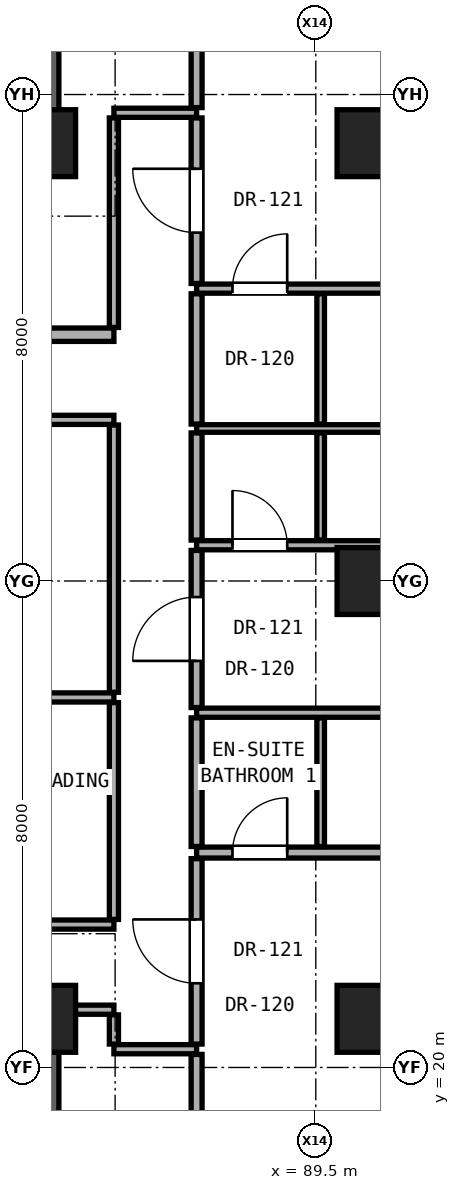
"""IFC4 building model, lengths in metres.
Left out: names, types, materials, properties, quantities, classifications, styles, units other than length and angle.
Written with IfcOpenShell. Run it as: python <this file> out.ifc"""

import sys

from ifc_helpers import new_model, si_unit, direction, frame, frame_2d, origin, origin_2d, place, context, subcontext, project, spatial, rectangle, hollow_rectangle, extrude, element, fill, save


model = new_model("IFC4")
c1 = context("Model", 3, precision=1e-05, world=origin(), true_north=direction((0.0, 1.0)))
c2 = subcontext(c1, "Body", "Model", "MODEL_VIEW")
j1 = project(units=[si_unit("LENGTHUNIT", "METRE"), si_unit("PLANEANGLEUNIT", "RADIAN")], contexts=[c1])
p1 = place(None, origin())
s1 = spatial("IfcSite", under=j1, at=p1, CompositionType="ELEMENT")
p2 = place(p1, origin())
s2 = spatial("IfcBuilding", under=s1, at=p2, CompositionType="ELEMENT")
p3 = place(p2, frame((0.0, 0.0, 141.2)))
s3 = spatial("IfcBuildingStorey", under=s2, at=p3, CompositionType="ELEMENT", Elevation=141.2)
for number, where, z_axis, x_axis in (
    (1, (85.0, 20.8, 0.0), (0.0, 0.0, 1.0), (1.0, 0.0, 0.0)),
    (2, (85.0, 35.2, 0.0), (0.0, 0.0, 1.0), (1.0, 0.0, 0.0)),
):
    element("IfcColumn", number, at=place(p3, frame(where, z_axis=z_axis, x_axis=x_axis)), inside=s3, PredefinedType="COLUMN", context=c2, shape_type="SweptSolid", body=[
        extrude(rectangle(XDim=1.1, YDim=1.1, at=origin_2d()), origin(), (0.0, 0.0, 1.0), 3.3),
    ])
for number, where, z_axis, x_axis in (
    (3, (90.4, 20.8, 0.0), (0.0, 0.0, 1.0), (1.0, 0.0, 0.0)),
    (4, (90.4, 28.0, 0.0), (0.0, 0.0, 1.0), (1.0, 0.0, 0.0)),
    (5, (90.4, 35.2, 0.0), (0.0, 0.0, 1.0), (1.0, 0.0, 0.0)),
):
    element("IfcColumn", number, at=place(p3, frame(where, z_axis=z_axis, x_axis=x_axis)), inside=s3, PredefinedType="COLUMN", context=c2, shape_type="SweptSolid", body=[
        extrude(hollow_rectangle(XDim=1.1, YDim=1.1, WallThickness=0.06, at=origin_2d()), origin(), (0.0, 0.0, 1.0), 3.3),
    ])
for number, where, z_axis, x_axis in (
    (6, (85.0, 35.2, 0.0), (0.0, 0.0, 1.0), (0.0, 1.0, 0.0)),
    (7, (85.0, 15.2, 0.0), (0.0, 0.0, 1.0), (0.0, 1.0, 0.0)),
):
    element("IfcWall", number, at=place(p3, frame(where, z_axis=z_axis, x_axis=x_axis)), inside=s3, PredefinedType="SHEAR", context=c2, shape_type="SweptSolid", body=[
        extrude(rectangle(XDim=5.6, YDim=0.55, at=frame_2d((2.8, 0.0))), origin(), (0.0, 0.0, 1.0), 3.08),
    ])
p4 = place(p3, frame((86.18, 20.3, 0.0), z_axis=(0.0, 0.0, 1.0), x_axis=(1.0, 0.0, 0.0)))
e8 = element("IfcWall", 8, at=p4, inside=s3, PredefinedType="PARTITIONING", context=c2, shape_type="SweptSolid", body=[
    extrude(rectangle(XDim=1.36, YDim=0.15, at=frame_2d((0.68, 0.0))), origin(), (0.0, 0.0, 1.0), 3.08),
])
p5 = place(p3, frame((85.27, 20.95, 0.0), z_axis=(0.0, 0.0, 1.0), x_axis=(1.0, 0.0, 0.0)))
e9 = element("IfcWall", 9, at=p5, inside=s3, PredefinedType="PARTITIONING", context=c2, shape_type="SweptSolid", body=[
    extrude(rectangle(XDim=0.91, YDim=0.15, at=frame_2d((0.455, 0.0))), origin(), (0.0, 0.0, 1.0), 2.472),
])
p6 = place(p3, frame((66.68, 22.35, 0.0), z_axis=(0.0, 0.0, 1.0), x_axis=(1.0, 0.0, 0.0)))
e10 = element("IfcWall", 10, at=p6, inside=s3, PredefinedType="PARTITIONING", context=c2, shape_type="SweptSolid", body=[
    extrude(rectangle(XDim=19.5, YDim=0.15, at=frame_2d((9.75, 0.0))), origin(), (0.0, 0.0, 1.0), 2.216),
])
p7 = place(p6, frame((8.802, 0.0, 0.0)))
e11 = element("IfcOpeningElement", 11, at=p7, cuts=e10, PredefinedType="OPENING", context=c2, shape_type="SweptSolid", body=[
    extrude(rectangle(XDim=1.05, YDim=2.2, at=frame_2d((0.525, 1.1))), frame((0.0, 0.085, 0.0), z_axis=(0.0, -1.0, 0.0), x_axis=(1.0, 0.0, 0.0)), (0.0, 0.0, 1.0), 0.17),
])
p8 = place(p6, frame((15.846, 0.0, 0.0)))
e12 = element("IfcOpeningElement", 12, at=p8, cuts=e10, PredefinedType="OPENING", context=c2, shape_type="SweptSolid", body=[
    extrude(rectangle(XDim=1.05, YDim=2.2, at=frame_2d((0.525, 1.1))), frame((0.0, 0.085, 0.0), z_axis=(0.0, -1.0, 0.0), x_axis=(1.0, 0.0, 0.0)), (0.0, 0.0, 1.0), 0.17),
])
p9 = place(p3, frame((87.54, 23.534, 0.0), z_axis=(0.0, 0.0, 1.0), x_axis=(1.0, 0.0, 0.0)))
e13 = element("IfcWall", 13, at=p9, inside=s3, PredefinedType="PARTITIONING", context=c2, shape_type="SweptSolid", body=[
    extrude(rectangle(XDim=7.471, YDim=0.18, at=frame_2d((3.735, 0.0))), origin(), (0.0, 0.0, 1.0), 2.299),
])
p10 = place(p9, frame((4.26, 0.0, 0.0)))
e14 = element("IfcOpeningElement", 14, at=p10, cuts=e13, PredefinedType="OPENING", context=c2, shape_type="SweptSolid", body=[
    extrude(rectangle(XDim=0.95, YDim=2.15, at=frame_2d((0.475, 1.075))), frame((0.0, 0.1, 0.0), z_axis=(0.0, -1.0, 0.0), x_axis=(1.0, 0.0, 0.0)), (0.0, 0.0, 1.0), 0.2),
])
p11 = place(p9, frame((0.59, 0.0, 0.0)))
e15 = element("IfcOpeningElement", 15, at=p11, cuts=e13, PredefinedType="OPENING", context=c2, shape_type="SweptSolid", body=[
    extrude(rectangle(XDim=0.9, YDim=2.1, at=frame_2d((0.45, 1.05))), frame((0.0, 0.1, 0.0), z_axis=(0.0, -1.0, 0.0), x_axis=(1.0, 0.0, 0.0)), (0.0, 0.0, 1.0), 0.2),
])
p12 = place(p3, frame((87.54, 25.834, 0.0), z_axis=(0.0, 0.0, 1.0), x_axis=(1.0, 0.0, 0.0)))
e16 = element("IfcWall", 16, at=p12, inside=s3, PredefinedType="PARTITIONING", context=c2, shape_type="SweptSolid", body=[
    extrude(rectangle(XDim=7.471, YDim=0.15, at=frame_2d((3.735, 0.0))), origin(), (0.0, 0.0, 1.0), 2.299),
])
p13 = place(p3, frame((72.05, 26.085, 0.0), z_axis=(0.0, 0.0, 1.0), x_axis=(1.0, 0.0, 0.0)))
e17 = element("IfcWall", 17, at=p13, inside=s3, PredefinedType="PARTITIONING", context=c2, shape_type="SweptSolid", body=[
    extrude(rectangle(XDim=14.13, YDim=0.15, at=frame_2d((7.065, 0.0))), origin(), (0.0, 0.0, 1.0), 2.216),
])
p14 = place(p3, frame((87.54, 28.588, 0.0), z_axis=(0.0, 0.0, 1.0), x_axis=(1.0, 0.0, 0.0)))
e18 = element("IfcWall", 18, at=p14, inside=s3, PredefinedType="PARTITIONING", context=c2, shape_type="SweptSolid", body=[
    extrude(rectangle(XDim=7.471, YDim=0.15, at=frame_2d((3.735, 0.0))), origin(), (0.0, 0.0, 1.0), 2.299),
])
p15 = place(p14, frame((4.26, 0.0, 0.0)))
e19 = element("IfcOpeningElement", 19, at=p15, cuts=e18, PredefinedType="OPENING", context=c2, shape_type="SweptSolid", body=[
    extrude(rectangle(XDim=0.95, YDim=2.15, at=frame_2d((0.475, 1.075))), frame((0.0, 0.085, 0.0), z_axis=(0.0, -1.0, 0.0), x_axis=(1.0, 0.0, 0.0)), (0.0, 0.0, 1.0), 0.17),
])
p16 = place(p14, frame((0.59, 0.0, 0.0)))
e20 = element("IfcOpeningElement", 20, at=p16, cuts=e18, PredefinedType="OPENING", context=c2, shape_type="SweptSolid", body=[
    extrude(rectangle(XDim=0.9, YDim=2.1, at=frame_2d((0.45, 1.05))), frame((0.0, 0.085, 0.0), z_axis=(0.0, -1.0, 0.0), x_axis=(1.0, 0.0, 0.0)), (0.0, 0.0, 1.0), 0.17),
])
p17 = place(p3, frame((66.68, 30.65, 0.0), z_axis=(0.0, 0.0, 1.0), x_axis=(1.0, 0.0, 0.0)))
e21 = element("IfcWall", 21, at=p17, inside=s3, PredefinedType="PARTITIONING", context=c2, shape_type="SweptSolid", body=[
    extrude(rectangle(XDim=19.5, YDim=0.15, at=frame_2d((9.75, 0.0))), origin(), (0.0, 0.0, 1.0), 2.216),
])
p18 = place(p17, frame((3.745, 0.0, 0.0)))
e22 = element("IfcOpeningElement", 22, at=p18, cuts=e21, PredefinedType="OPENING", context=c2, shape_type="SweptSolid", body=[
    extrude(rectangle(XDim=0.95, YDim=2.15, at=frame_2d((0.475, 1.075))), frame((0.0, 0.085, 0.0), z_axis=(0.0, -1.0, 0.0), x_axis=(1.0, 0.0, 0.0)), (0.0, 0.0, 1.0), 0.17),
])
p19 = place(p17, frame((8.802, 0.0, 0.0)))
e23 = element("IfcOpeningElement", 23, at=p19, cuts=e21, PredefinedType="OPENING", context=c2, shape_type="SweptSolid", body=[
    extrude(rectangle(XDim=1.05, YDim=2.2, at=frame_2d((0.525, 1.1))), frame((0.0, 0.085, 0.0), z_axis=(0.0, -1.0, 0.0), x_axis=(1.0, 0.0, 0.0)), (0.0, 0.0, 1.0), 0.17),
])
p20 = place(p17, frame((15.846, 0.0, 0.0)))
e24 = element("IfcOpeningElement", 24, at=p20, cuts=e21, PredefinedType="OPENING", context=c2, shape_type="SweptSolid", body=[
    extrude(rectangle(XDim=1.05, YDim=2.2, at=frame_2d((0.525, 1.1))), frame((0.0, 0.085, 0.0), z_axis=(0.0, -1.0, 0.0), x_axis=(1.0, 0.0, 0.0)), (0.0, 0.0, 1.0), 0.17),
])
p21 = place(p3, frame((87.54, 30.508, 0.0), z_axis=(0.0, 0.0, 1.0), x_axis=(1.0, 0.0, 0.0)))
e25 = element("IfcWall", 25, at=p21, inside=s3, PredefinedType="PARTITIONING", context=c2, shape_type="SweptSolid", body=[
    extrude(rectangle(XDim=7.471, YDim=0.125, at=frame_2d((3.735, 0.0))), origin(), (0.0, 0.0, 1.0), 2.299),
])
p22 = place(p3, frame((71.55, 32.05, 0.0), z_axis=(0.0, 0.0, 1.0), x_axis=(1.0, 0.0, 0.0)))
e26 = element("IfcWall", 26, at=p22, inside=s3, PredefinedType="SOLIDWALL", context=c2, shape_type="SweptSolid", body=[
    extrude(rectangle(XDim=14.63, YDim=0.22, at=frame_2d((7.315, 0.0))), origin(), (0.0, 0.0, 1.0), 2.216),
])
p23 = place(p22, frame((6.065, 0.0, 0.0)))
e27 = element("IfcOpeningElement", 27, at=p23, cuts=e26, PredefinedType="OPENING", context=c2, shape_type="SweptSolid", body=[
    extrude(rectangle(XDim=0.85, YDim=2.01, at=frame_2d((0.425, 1.005))), frame((0.0, 0.12, 0.0), z_axis=(0.0, -1.0, 0.0), x_axis=(1.0, 0.0, 0.0)), (0.0, 0.0, 1.0), 0.24),
])
p24 = place(p22, frame((10.535, 0.0, 0.0)))
e28 = element("IfcOpeningElement", 28, at=p24, cuts=e26, PredefinedType="OPENING", context=c2, shape_type="SweptSolid", body=[
    extrude(rectangle(XDim=0.95, YDim=2.15, at=frame_2d((0.475, 1.075))), frame((0.0, 0.12, 0.0), z_axis=(0.0, -1.0, 0.0), x_axis=(1.0, 0.0, 0.0)), (0.0, 0.0, 1.0), 0.24),
])
p25 = place(p22, frame((1.65, 0.0, 0.0)))
e29 = element("IfcOpeningElement", 29, at=p25, cuts=e26, PredefinedType="OPENING", context=c2, shape_type="SweptSolid", body=[
    extrude(rectangle(XDim=0.85, YDim=2.01, at=frame_2d((0.425, 1.005))), frame((0.0, 0.12, 0.0), z_axis=(0.0, -1.0, 0.0), x_axis=(1.0, 0.0, 0.0)), (0.0, 0.0, 1.0), 0.24),
])
p26 = place(p3, frame((87.54, 32.808, 0.0), z_axis=(0.0, 0.0, 1.0), x_axis=(1.0, 0.0, 0.0)))
e30 = element("IfcWall", 30, at=p26, inside=s3, PredefinedType="PARTITIONING", context=c2, shape_type="SweptSolid", body=[
    extrude(rectangle(XDim=7.471, YDim=0.15, at=frame_2d((3.735, 0.0))), origin(), (0.0, 0.0, 1.0), 2.299),
])
p27 = place(p26, frame((4.26, 0.0, 0.0)))
e31 = element("IfcOpeningElement", 31, at=p27, cuts=e30, PredefinedType="OPENING", context=c2, shape_type="SweptSolid", body=[
    extrude(rectangle(XDim=0.95, YDim=2.15, at=frame_2d((0.475, 1.075))), frame((0.0, 0.085, 0.0), z_axis=(0.0, -1.0, 0.0), x_axis=(1.0, 0.0, 0.0)), (0.0, 0.0, 1.0), 0.17),
])
p28 = place(p26, frame((0.59, 0.0, 0.0)))
e32 = element("IfcOpeningElement", 32, at=p28, cuts=e30, PredefinedType="OPENING", context=c2, shape_type="SweptSolid", body=[
    extrude(rectangle(XDim=0.9, YDim=2.1, at=frame_2d((0.45, 1.05))), frame((0.0, 0.085, 0.0), z_axis=(0.0, -1.0, 0.0), x_axis=(1.0, 0.0, 0.0)), (0.0, 0.0, 1.0), 0.17),
])
p29 = place(p3, frame((86.18, 35.7, 0.0), z_axis=(0.0, 0.0, 1.0), x_axis=(1.0, 0.0, 0.0)))
e33 = element("IfcWall", 33, at=p29, inside=s3, PredefinedType="PARTITIONING", context=c2, shape_type="SweptSolid", body=[
    extrude(rectangle(XDim=1.36, YDim=0.15, at=frame_2d((0.68, 0.0))), origin(), (0.0, 0.0, 1.0), 3.08),
])
p30 = place(p3, frame((86.18, 20.385, 0.0), z_axis=(0.0, 0.0, 1.0), x_axis=(0.0, 1.0, 0.0)))
e34 = element("IfcWall", 34, at=p30, inside=s3, PredefinedType="PARTITIONING", context=c2, shape_type="SweptSolid", body=[
    extrude(rectangle(XDim=0.48, YDim=0.15, at=frame_2d((0.24, 0.0))), origin(), (0.0, 0.0, 1.0), 2.472),
])
p31 = place(p3, frame((86.18, 22.435, 0.0), z_axis=(0.0, 0.0, 1.0), x_axis=(0.0, 1.0, 0.0)))
e35 = element("IfcWall", 35, at=p31, inside=s3, PredefinedType="PARTITIONING", context=c2, shape_type="SweptSolid", body=[
    extrude(rectangle(XDim=3.565, YDim=0.15, at=frame_2d((1.782, 0.0))), origin(), (0.0, 0.0, 1.0), 3.08),
])
p32 = place(p3, frame((86.18, 26.17, 0.0), z_axis=(0.0, 0.0, 1.0), x_axis=(0.0, 1.0, 0.0)))
e36 = element("IfcWall", 36, at=p32, inside=s3, PredefinedType="PARTITIONING", context=c2, shape_type="SweptSolid", body=[
    extrude(rectangle(XDim=4.395, YDim=0.15, at=frame_2d((2.198, 0.0))), origin(), (0.0, 0.0, 1.0), 2.376),
])
p33 = place(p3, frame((86.18, 32.17, 0.0), z_axis=(0.0, 0.0, 1.0), x_axis=(0.0, 1.0, 0.0)))
e37 = element("IfcWall", 37, at=p33, inside=s3, PredefinedType="PARTITIONING", context=c2, shape_type="SweptSolid", body=[
    extrude(rectangle(XDim=3.445, YDim=0.15, at=frame_2d((1.723, 0.0))), origin(), (0.0, 0.0, 1.0), 2.472),
])
p34 = place(p3, frame((87.54, 16.584, 0.0), z_axis=(0.0, 0.0, 1.0), x_axis=(0.0, 1.0, 0.0)))
e38 = element("IfcWall", 38, at=p34, inside=s3, PredefinedType="PARTITIONING", context=c2, shape_type="SweptSolid", body=[
    extrude(rectangle(XDim=3.631, YDim=0.18, at=frame_2d((1.815, 0.0))), origin(), (0.0, 0.0, 1.0), 2.523),
])
p35 = place(p3, frame((87.54, 20.385, 0.0), z_axis=(0.0, 0.0, 1.0), x_axis=(0.0, 1.0, 0.0)))
e39 = element("IfcWall", 39, at=p35, inside=s3, PredefinedType="PARTITIONING", context=c2, shape_type="SweptSolid", body=[
    extrude(rectangle(XDim=3.049, YDim=0.18, at=frame_2d((1.524, 0.0))), origin(), (0.0, 0.0, 1.0), 2.472),
])
p36 = place(p35, frame((1.0, 0.0, 0.0)))
e40 = element("IfcOpeningElement", 40, at=p36, cuts=e39, PredefinedType="OPENING", context=c2, shape_type="SweptSolid", body=[
    extrude(rectangle(XDim=1.05, YDim=2.2, at=frame_2d((0.525, 1.1))), frame((0.0, 0.1, 0.0), z_axis=(0.0, -1.0, 0.0), x_axis=(1.0, 0.0, 0.0)), (0.0, 0.0, 1.0), 0.2),
])
p37 = place(p3, frame((87.54, 23.634, 0.0), z_axis=(0.0, 0.0, 1.0), x_axis=(0.0, 1.0, 0.0)))
e41 = element("IfcWall", 41, at=p37, inside=s3, PredefinedType="PARTITIONING", context=c2, shape_type="SweptSolid", body=[
    extrude(rectangle(XDim=2.115, YDim=0.18, at=frame_2d((1.058, 0.0))), origin(), (0.0, 0.0, 1.0), 3.08),
])
p38 = place(p3, frame((87.54, 25.919, 0.0), z_axis=(0.0, 0.0, 1.0), x_axis=(0.0, 1.0, 0.0)))
e42 = element("IfcWall", 42, at=p38, inside=s3, PredefinedType="PARTITIONING", context=c2, shape_type="SweptSolid", body=[
    extrude(rectangle(XDim=2.584, YDim=0.18, at=frame_2d((1.292, 0.0))), origin(), (0.0, 0.0, 1.0), 2.376),
])
p39 = place(p38, frame((0.767, 0.0, 0.0)))
e43 = element("IfcOpeningElement", 43, at=p39, cuts=e42, PredefinedType="OPENING", context=c2, shape_type="SweptSolid", body=[
    extrude(rectangle(XDim=1.05, YDim=2.2, at=frame_2d((0.525, 1.1))), frame((0.0, 0.1, 0.0), z_axis=(0.0, -1.0, 0.0), x_axis=(1.0, 0.0, 0.0)), (0.0, 0.0, 1.0), 0.2),
])
p40 = place(p3, frame((87.54, 28.673, 0.0), z_axis=(0.0, 0.0, 1.0), x_axis=(0.0, 1.0, 0.0)))
e44 = element("IfcWall", 44, at=p40, inside=s3, PredefinedType="PARTITIONING", context=c2, shape_type="SweptSolid", body=[
    extrude(rectangle(XDim=1.762, YDim=0.18, at=frame_2d((0.881, 0.0))), origin(), (0.0, 0.0, 1.0), 3.08),
])
p41 = place(p3, frame((87.54, 30.581, 0.0), z_axis=(0.0, 0.0, 1.0), x_axis=(0.0, 1.0, 0.0)))
e45 = element("IfcWall", 45, at=p41, inside=s3, PredefinedType="PARTITIONING", context=c2, shape_type="SweptSolid", body=[
    extrude(rectangle(XDim=2.142, YDim=0.18, at=frame_2d((1.071, 0.0))), origin(), (0.0, 0.0, 1.0), 3.08),
])
p42 = place(p3, frame((87.54, 32.893, 0.0), z_axis=(0.0, 0.0, 1.0), x_axis=(0.0, 1.0, 0.0)))
e46 = element("IfcWall", 46, at=p42, inside=s3, PredefinedType="PARTITIONING", context=c2, shape_type="SweptSolid", body=[
    extrude(rectangle(XDim=2.722, YDim=0.18, at=frame_2d((1.361, 0.0))), origin(), (0.0, 0.0, 1.0), 2.472),
])
p43 = place(p42, frame((0.836, 0.0, 0.0)))
e47 = element("IfcOpeningElement", 47, at=p43, cuts=e46, PredefinedType="OPENING", context=c2, shape_type="SweptSolid", body=[
    extrude(rectangle(XDim=1.05, YDim=2.2, at=frame_2d((0.525, 1.1))), frame((0.0, 0.1, 0.0), z_axis=(0.0, -1.0, 0.0), x_axis=(1.0, 0.0, 0.0)), (0.0, 0.0, 1.0), 0.2),
])
p44 = place(p3, frame((87.54, 35.785, 0.0), z_axis=(0.0, 0.0, 1.0), x_axis=(0.0, 1.0, 0.0)))
e48 = element("IfcWall", 48, at=p44, inside=s3, PredefinedType="PARTITIONING", context=c2, shape_type="SweptSolid", body=[
    extrude(rectangle(XDim=3.646, YDim=0.18, at=frame_2d((1.823, 0.0))), origin(), (0.0, 0.0, 1.0), 2.523),
])
p45 = place(p3, frame((89.58, 23.634, 0.0), z_axis=(0.0, 0.0, 1.0), x_axis=(0.0, 1.0, 0.0)))
e49 = element("IfcWall", 49, at=p45, inside=s3, PredefinedType="PARTITIONING", context=c2, shape_type="SweptSolid", body=[
    extrude(rectangle(XDim=2.115, YDim=0.125, at=frame_2d((1.058, 0.0))), origin(), (0.0, 0.0, 1.0), 3.08),
])
p46 = place(p3, frame((89.58, 28.673, 0.0), z_axis=(0.0, 0.0, 1.0), x_axis=(0.0, 1.0, 0.0)))
e50 = element("IfcWall", 50, at=p46, inside=s3, PredefinedType="PARTITIONING", context=c2, shape_type="SweptSolid", body=[
    extrude(rectangle(XDim=1.762, YDim=0.125, at=frame_2d((0.881, 0.0))), origin(), (0.0, 0.0, 1.0), 3.08),
])
p47 = place(p3, frame((89.58, 30.581, 0.0), z_axis=(0.0, 0.0, 1.0), x_axis=(0.0, 1.0, 0.0)))
e51 = element("IfcWall", 51, at=p47, inside=s3, PredefinedType="PARTITIONING", context=c2, shape_type="SweptSolid", body=[
    extrude(rectangle(XDim=2.142, YDim=0.125, at=frame_2d((1.071, 0.0))), origin(), (0.0, 0.0, 1.0), 3.08),
])
p48 = place(p36, origin())
e52 = element("IfcDoor", 52, at=p48, inside=s3, OperationType="SINGLE_SWING_RIGHT", PredefinedType="DOOR", context=c2, shape_type="SweptSolid", body=[
    extrude(rectangle(XDim=1.05, YDim=2.2, at=frame_2d((0.525, 1.1))), frame((0.0, 0.025, 0.0), z_axis=(0.0, -1.0, 0.0), x_axis=(1.0, 0.0, 0.0)), (0.0, 0.0, 1.0), 0.05),
])
fill(e40, e52)
p49 = place(p11, origin())
e53 = element("IfcDoor", 53, at=p49, inside=s3, OperationType="SINGLE_SWING_RIGHT", PredefinedType="DOOR", context=c2, shape_type="SweptSolid", body=[
    extrude(rectangle(XDim=0.9, YDim=2.1, at=frame_2d((0.45, 1.05))), frame((0.0, 0.025, 0.0), z_axis=(0.0, -1.0, 0.0), x_axis=(1.0, 0.0, 0.0)), (0.0, 0.0, 1.0), 0.05),
])
fill(e15, e53)
p50 = place(p39, origin())
e54 = element("IfcDoor", 54, at=p50, inside=s3, OperationType="SINGLE_SWING_LEFT", PredefinedType="DOOR", context=c2, shape_type="SweptSolid", body=[
    extrude(rectangle(XDim=1.05, YDim=2.2, at=frame_2d((0.525, 1.1))), frame((0.0, 0.025, 0.0), z_axis=(0.0, -1.0, 0.0), x_axis=(1.0, 0.0, 0.0)), (0.0, 0.0, 1.0), 0.05),
])
fill(e43, e54)
p51 = place(p16, origin())
e55 = element("IfcDoor", 55, at=p51, inside=s3, OperationType="SINGLE_SWING_LEFT", PredefinedType="DOOR", context=c2, shape_type="SweptSolid", body=[
    extrude(rectangle(XDim=0.9, YDim=2.1, at=frame_2d((0.45, 1.05))), frame((0.0, 0.025, 0.0), z_axis=(0.0, -1.0, 0.0), x_axis=(1.0, 0.0, 0.0)), (0.0, 0.0, 1.0), 0.05),
])
fill(e20, e55)
p52 = place(p43, origin())
e56 = element("IfcDoor", 56, at=p52, inside=s3, OperationType="SINGLE_SWING_RIGHT", PredefinedType="DOOR", context=c2, shape_type="SweptSolid", body=[
    extrude(rectangle(XDim=1.05, YDim=2.2, at=frame_2d((0.525, 1.1))), frame((0.0, 0.025, 0.0), z_axis=(0.0, -1.0, 0.0), x_axis=(1.0, 0.0, 0.0)), (0.0, 0.0, 1.0), 0.05),
])
fill(e47, e56)
p53 = place(p28, origin())
e57 = element("IfcDoor", 57, at=p53, inside=s3, OperationType="SINGLE_SWING_RIGHT", PredefinedType="DOOR", context=c2, shape_type="SweptSolid", body=[
    extrude(rectangle(XDim=0.9, YDim=2.1, at=frame_2d((0.45, 1.05))), frame((0.0, 0.025, 0.0), z_axis=(0.0, -1.0, 0.0), x_axis=(1.0, 0.0, 0.0)), (0.0, 0.0, 1.0), 0.05),
])
fill(e32, e57)
save(model, sys.argv[1])
